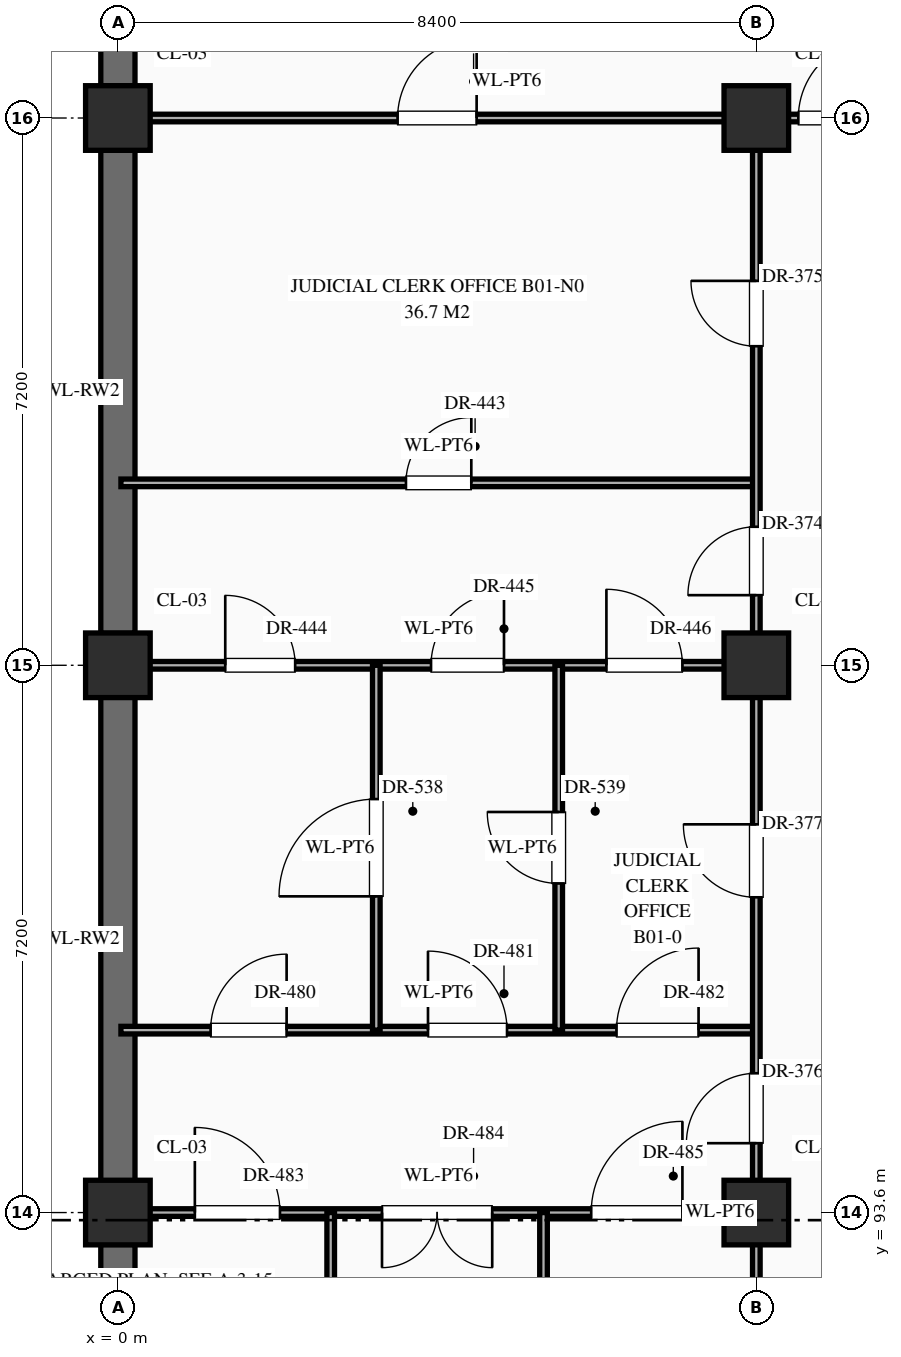
"""IFC4 building model, lengths in metres.
Left out: names, types, materials, properties, quantities, classifications, styles, units other than length and angle.
Written with IfcOpenShell. Run it as: python <this file> out.ifc"""

import sys

from ifc_helpers import new_model, si_unit, direction, frame, frame_2d, origin, origin_2d, place, context, subcontext, project, spatial, rectangle, extrude, element, fill, save


model = new_model("IFC4")
c1 = context("Model", 3, precision=1e-05, world=origin(), true_north=direction((0.0, 1.0)))
c2 = subcontext(c1, "Body", "Model", "MODEL_VIEW")
j1 = project(units=[si_unit("LENGTHUNIT", "METRE"), si_unit("PLANEANGLEUNIT", "RADIAN")], contexts=[c1])
p1 = place(None, origin())
s1 = spatial("IfcSite", under=j1, at=p1, CompositionType="ELEMENT")
p2 = place(p1, origin())
s2 = spatial("IfcBuilding", under=s1, at=p2, CompositionType="ELEMENT")
p3 = place(p2, frame((0.0, 0.0, -5.4)))
s3 = spatial("IfcBuildingStorey", under=s2, at=p3, CompositionType="ELEMENT", Elevation=-5.4)
for number, where, z_axis, x_axis in (
    (1, (0.0, 93.6, 0.0), (0.0, 0.0, 1.0), (1.0, 0.0, 0.0)),
    (2, (0.0, 100.8, 0.0), (0.0, 0.0, 1.0), (1.0, 0.0, 0.0)),
    (3, (0.0, 108.0, 0.0), (0.0, 0.0, 1.0), (1.0, 0.0, 0.0)),
    (4, (8.4, 93.6, 0.0), (0.0, 0.0, 1.0), (1.0, 0.0, 0.0)),
    (5, (8.4, 100.8, 0.0), (0.0, 0.0, 1.0), (1.0, 0.0, 0.0)),
    (6, (8.4, 108.0, 0.0), (0.0, 0.0, 1.0), (1.0, 0.0, 0.0)),
):
    element("IfcColumn", number, at=place(p3, frame(where, z_axis=z_axis, x_axis=x_axis)), inside=s3, PredefinedType="COLUMN", context=c2, shape_type="SweptSolid", body=[
        extrude(rectangle(XDim=0.85, YDim=0.85, at=origin_2d()), origin(), (0.0, 0.0, 1.0), 5.4),
    ])
for number, where, z_axis, x_axis in (
    (7, (0.0, 86.82, 0.0), (0.0, 0.0, 1.0), (0.0, 1.0, 0.0)),
    (8, (0.0, 94.02, 0.0), (0.0, 0.0, 1.0), (0.0, 1.0, 0.0)),
):
    element("IfcWall", number, at=place(p3, frame(where, z_axis=z_axis, x_axis=x_axis)), inside=s3, PredefinedType="USERDEFINED", context=c2, shape_type="SweptSolid", body=[
        extrude(rectangle(XDim=6.36, YDim=0.45, at=frame_2d((3.18, 0.0))), origin(), (0.0, 0.0, 1.0), 5.1),
    ])
p4 = place(p3, frame((0.0, 101.22, 0.0), z_axis=(0.0, 0.0, 1.0), x_axis=(0.0, 1.0, 0.0)))
e9 = element("IfcWall", 9, at=p4, inside=s3, PredefinedType="USERDEFINED", context=c2, shape_type="SweptSolid", body=[
    extrude(rectangle(XDim=6.36, YDim=0.45, at=frame_2d((3.18, 0.0))), origin(), (0.0, 0.0, 1.0), 5.1),
])
p5 = place(p3, frame((0.0, 108.42, 0.0), z_axis=(0.0, 0.0, 1.0), x_axis=(0.0, 1.0, 0.0)))
e10 = element("IfcWall", 10, at=p5, inside=s3, PredefinedType="USERDEFINED", context=c2, shape_type="SweptSolid", body=[
    extrude(rectangle(XDim=6.36, YDim=0.45, at=frame_2d((3.18, 0.0))), origin(), (0.0, 0.0, 1.0), 4.98),
])
p6 = place(p3, frame((0.04, 93.6, 0.0), z_axis=(0.0, 0.0, 1.0), x_axis=(1.0, 0.0, 0.0)))
e11 = element("IfcWall", 11, at=p6, inside=s3, PredefinedType="STANDARD", context=c2, shape_type="SweptSolid", body=[
    extrude(rectangle(XDim=8.36, YDim=0.1, at=frame_2d((4.18, 0.0))), origin(), (0.0, 0.0, 1.0), 4.25),
])
p7 = place(p6, frame((0.972, 0.0, 0.0)))
e12 = element("IfcOpeningElement", 12, at=p7, cuts=e11, PredefinedType="OPENING", context=c2, shape_type="SweptSolid", body=[
    extrude(rectangle(XDim=1.12, YDim=2.25, at=frame_2d((0.56, 1.125))), frame((0.0, 0.062, 0.0), z_axis=(0.0, -1.0, 0.0), x_axis=(1.0, 0.0, 0.0)), (0.0, 0.0, 1.0), 0.124),
])
p8 = place(p6, frame((3.435, 0.0, 0.0)))
e13 = element("IfcOpeningElement", 13, at=p8, cuts=e11, PredefinedType="OPENING", context=c2, shape_type="SweptSolid", body=[
    extrude(rectangle(XDim=1.45, YDim=2.3, at=frame_2d((0.725, 1.15))), frame((0.0, 0.062, 0.0), z_axis=(0.0, -1.0, 0.0), x_axis=(1.0, 0.0, 0.0)), (0.0, 0.0, 1.0), 0.124),
])
p9 = place(p6, frame((6.188, 0.0, 0.0)))
e14 = element("IfcOpeningElement", 14, at=p9, cuts=e11, PredefinedType="OPENING", context=c2, shape_type="SweptSolid", body=[
    extrude(rectangle(XDim=1.2, YDim=2.35, at=frame_2d((0.6, 1.175))), frame((0.0, 0.062, 0.0), z_axis=(0.0, -1.0, 0.0), x_axis=(1.0, 0.0, 0.0)), (0.0, 0.0, 1.0), 0.124),
])
p10 = place(p3, frame((0.04, 96.0, 0.0), z_axis=(0.0, 0.0, 1.0), x_axis=(1.0, 0.0, 0.0)))
e15 = element("IfcWall", 15, at=p10, inside=s3, PredefinedType="STANDARD", context=c2, shape_type="SweptSolid", body=[
    extrude(rectangle(XDim=8.36, YDim=0.1, at=frame_2d((4.18, 0.0))), origin(), (0.0, 0.0, 1.0), 5.1),
])
p11 = place(p10, frame((1.18, 0.0, 0.0)))
e16 = element("IfcOpeningElement", 16, at=p11, cuts=e15, PredefinedType="OPENING", context=c2, shape_type="SweptSolid", body=[
    extrude(rectangle(XDim=1.0, YDim=2.25, at=frame_2d((0.5, 1.125))), frame((0.0, 0.062, 0.0), z_axis=(0.0, -1.0, 0.0), x_axis=(1.0, 0.0, 0.0)), (0.0, 0.0, 1.0), 0.124),
])
p12 = place(p10, frame((4.04, 0.0, 0.0)))
e17 = element("IfcOpeningElement", 17, at=p12, cuts=e15, PredefinedType="OPENING", context=c2, shape_type="SweptSolid", body=[
    extrude(rectangle(XDim=1.04, YDim=2.2, at=frame_2d((0.52, 1.1))), frame((0.0, 0.062, 0.0), z_axis=(0.0, -1.0, 0.0), x_axis=(1.0, 0.0, 0.0)), (0.0, 0.0, 1.0), 0.124),
])
p13 = place(p10, frame((6.52, 0.0, 0.0)))
e18 = element("IfcOpeningElement", 18, at=p13, cuts=e15, PredefinedType="OPENING", context=c2, shape_type="SweptSolid", body=[
    extrude(rectangle(XDim=1.08, YDim=2.25, at=frame_2d((0.54, 1.125))), frame((0.0, 0.062, 0.0), z_axis=(0.0, -1.0, 0.0), x_axis=(1.0, 0.0, 0.0)), (0.0, 0.0, 1.0), 0.124),
])
p14 = place(p3, frame((0.04, 100.8, 0.0), z_axis=(0.0, 0.0, 1.0), x_axis=(1.0, 0.0, 0.0)))
e19 = element("IfcWall", 19, at=p14, inside=s3, PredefinedType="STANDARD", context=c2, shape_type="SweptSolid", body=[
    extrude(rectangle(XDim=8.36, YDim=0.1, at=frame_2d((4.18, 0.0))), origin(), (0.0, 0.0, 1.0), 4.25),
])
p15 = place(p14, frame((1.373, 0.0, 0.0)))
e20 = element("IfcOpeningElement", 20, at=p15, cuts=e19, PredefinedType="OPENING", context=c2, shape_type="SweptSolid", body=[
    extrude(rectangle(XDim=0.92, YDim=2.15, at=frame_2d((0.46, 1.075))), frame((0.0, 0.062, 0.0), z_axis=(0.0, -1.0, 0.0), x_axis=(1.0, 0.0, 0.0)), (0.0, 0.0, 1.0), 0.124),
])
p16 = place(p14, frame((4.08, 0.0, 0.0)))
e21 = element("IfcOpeningElement", 21, at=p16, cuts=e19, PredefinedType="OPENING", context=c2, shape_type="SweptSolid", body=[
    extrude(rectangle(XDim=0.96, YDim=2.2, at=frame_2d((0.48, 1.1))), frame((0.0, 0.062, 0.0), z_axis=(0.0, -1.0, 0.0), x_axis=(1.0, 0.0, 0.0)), (0.0, 0.0, 1.0), 0.124),
])
p17 = place(p14, frame((6.387, 0.0, 0.0)))
e22 = element("IfcOpeningElement", 22, at=p17, cuts=e19, PredefinedType="OPENING", context=c2, shape_type="SweptSolid", body=[
    extrude(rectangle(XDim=1.0, YDim=2.25, at=frame_2d((0.5, 1.125))), frame((0.0, 0.062, 0.0), z_axis=(0.0, -1.0, 0.0), x_axis=(1.0, 0.0, 0.0)), (0.0, 0.0, 1.0), 0.124),
])
p18 = place(p3, frame((0.04, 103.2, 0.0), z_axis=(0.0, 0.0, 1.0), x_axis=(1.0, 0.0, 0.0)))
e23 = element("IfcWall", 23, at=p18, inside=s3, PredefinedType="STANDARD", context=c2, shape_type="SweptSolid", body=[
    extrude(rectangle(XDim=8.36, YDim=0.1, at=frame_2d((4.18, 0.0))), origin(), (0.0, 0.0, 1.0), 5.1),
])
p19 = place(p18, frame((3.75, 0.0, 0.0)))
e24 = element("IfcOpeningElement", 24, at=p19, cuts=e23, PredefinedType="OPENING", context=c2, shape_type="SweptSolid", body=[
    extrude(rectangle(XDim=0.86, YDim=2.1, at=frame_2d((0.43, 1.05))), frame((0.0, 0.062, 0.0), z_axis=(0.0, -1.0, 0.0), x_axis=(1.0, 0.0, 0.0)), (0.0, 0.0, 1.0), 0.124),
])
p20 = place(p3, frame((0.04, 108.0, 0.0), z_axis=(0.0, 0.0, 1.0), x_axis=(1.0, 0.0, 0.0)))
e25 = element("IfcWall", 25, at=p20, inside=s3, PredefinedType="STANDARD", context=c2, shape_type="SweptSolid", body=[
    extrude(rectangle(XDim=10.16, YDim=0.1, at=frame_2d((5.08, 0.0))), origin(), (0.0, 0.0, 1.0), 4.13),
])
p21 = place(p20, frame((8.913, 0.0, 0.0)))
e26 = element("IfcOpeningElement", 26, at=p21, cuts=e25, PredefinedType="OPENING", context=c2, shape_type="SweptSolid", body=[
    extrude(rectangle(XDim=1.04, YDim=2.2, at=frame_2d((0.52, 1.1))), frame((0.0, 0.062, 0.0), z_axis=(0.0, -1.0, 0.0), x_axis=(1.0, 0.0, 0.0)), (0.0, 0.0, 1.0), 0.124),
])
p22 = place(p20, frame((3.64, 0.0, 0.0)))
e27 = element("IfcOpeningElement", 27, at=p22, cuts=e25, PredefinedType="OPENING", context=c2, shape_type="SweptSolid", body=[
    extrude(rectangle(XDim=1.04, YDim=2.2, at=frame_2d((0.52, 1.1))), frame((0.0, 0.062, 0.0), z_axis=(0.0, -1.0, 0.0), x_axis=(1.0, 0.0, 0.0)), (0.0, 0.0, 1.0), 0.124),
])
p23 = place(p3, frame((2.8, 86.4, 0.0), z_axis=(0.0, 0.0, 1.0), x_axis=(0.0, 1.0, 0.0)))
e28 = element("IfcWall", 28, at=p23, inside=s3, PredefinedType="STANDARD", context=c2, shape_type="SweptSolid", body=[
    extrude(rectangle(XDim=7.2, YDim=0.1, at=frame_2d((3.6, 0.0))), origin(), (0.0, 0.0, 1.0), 5.1),
])
p24 = place(p23, frame((3.02, 0.0, 0.0)))
e29 = element("IfcOpeningElement", 29, at=p24, cuts=e28, PredefinedType="OPENING", context=c2, shape_type="SweptSolid", body=[
    extrude(rectangle(XDim=1.16, YDim=2.3, at=frame_2d((0.58, 1.15))), frame((0.0, 0.062, 0.0), z_axis=(0.0, -1.0, 0.0), x_axis=(1.0, 0.0, 0.0)), (0.0, 0.0, 1.0), 0.124),
])
p25 = place(p3, frame((3.4, 96.0, 0.0), z_axis=(0.0, 0.0, 1.0), x_axis=(0.0, 1.0, 0.0)))
e30 = element("IfcWall", 30, at=p25, inside=s3, PredefinedType="STANDARD", context=c2, shape_type="SweptSolid", body=[
    extrude(rectangle(XDim=4.8, YDim=0.1, at=frame_2d((2.4, 0.0))), origin(), (0.0, 0.0, 1.0), 5.1),
])
p26 = place(p25, frame((1.76, 0.0, 0.0)))
e31 = element("IfcOpeningElement", 31, at=p26, cuts=e30, PredefinedType="OPENING", context=c2, shape_type="SweptSolid", body=[
    extrude(rectangle(XDim=1.28, YDim=2.35, at=frame_2d((0.64, 1.175))), frame((0.0, 0.062, 0.0), z_axis=(0.0, -1.0, 0.0), x_axis=(1.0, 0.0, 0.0)), (0.0, 0.0, 1.0), 0.124),
])
p27 = place(p3, frame((5.6, 86.4, 0.0), z_axis=(0.0, 0.0, 1.0), x_axis=(0.0, 1.0, 0.0)))
e32 = element("IfcWall", 32, at=p27, inside=s3, PredefinedType="STANDARD", context=c2, shape_type="SweptSolid", body=[
    extrude(rectangle(XDim=7.2, YDim=0.1, at=frame_2d((3.6, 0.0))), origin(), (0.0, 0.0, 1.0), 5.1),
])
p28 = place(p27, frame((2.98, 0.0, 0.0)))
e33 = element("IfcOpeningElement", 33, at=p28, cuts=e32, PredefinedType="OPENING", context=c2, shape_type="SweptSolid", body=[
    extrude(rectangle(XDim=1.24, YDim=2.3, at=frame_2d((0.62, 1.15))), frame((0.0, 0.062, 0.0), z_axis=(0.0, -1.0, 0.0), x_axis=(1.0, 0.0, 0.0)), (0.0, 0.0, 1.0), 0.124),
])
p29 = place(p3, frame((5.8, 96.0, 0.0), z_axis=(0.0, 0.0, 1.0), x_axis=(0.0, 1.0, 0.0)))
e34 = element("IfcWall", 34, at=p29, inside=s3, PredefinedType="STANDARD", context=c2, shape_type="SweptSolid", body=[
    extrude(rectangle(XDim=4.8, YDim=0.1, at=frame_2d((2.4, 0.0))), origin(), (0.0, 0.0, 1.0), 5.1),
])
p30 = place(p29, frame((1.93, 0.0, 0.0)))
e35 = element("IfcOpeningElement", 35, at=p30, cuts=e34, PredefinedType="OPENING", context=c2, shape_type="SweptSolid", body=[
    extrude(rectangle(XDim=0.94, YDim=2.3, at=frame_2d((0.47, 1.15))), frame((0.0, 0.062, 0.0), z_axis=(0.0, -1.0, 0.0), x_axis=(1.0, 0.0, 0.0)), (0.0, 0.0, 1.0), 0.124),
])
p31 = place(p3, frame((8.4, 79.2, 0.0), z_axis=(0.0, 0.0, 1.0), x_axis=(0.0, 1.0, 0.0)))
e36 = element("IfcWall", 36, at=p31, inside=s3, PredefinedType="STANDARD", context=c2, shape_type="SweptSolid", body=[
    extrude(rectangle(XDim=28.8, YDim=0.1, at=frame_2d((14.4, 0.0))), origin(), (0.0, 0.0, 1.0), 4.35),
])
p32 = place(p31, frame((22.522, 0.0, 0.0)))
e37 = element("IfcOpeningElement", 37, at=p32, cuts=e36, PredefinedType="OPENING", context=c2, shape_type="SweptSolid", body=[
    extrude(rectangle(XDim=0.9, YDim=2.15, at=frame_2d((0.45, 1.075))), frame((0.0, 0.062, 0.0), z_axis=(0.0, -1.0, 0.0), x_axis=(1.0, 0.0, 0.0)), (0.0, 0.0, 1.0), 0.124),
])
p33 = place(p31, frame((25.798, 0.0, 0.0)))
e38 = element("IfcOpeningElement", 38, at=p33, cuts=e36, PredefinedType="OPENING", context=c2, shape_type="SweptSolid", body=[
    extrude(rectangle(XDim=0.86, YDim=2.1, at=frame_2d((0.43, 1.05))), frame((0.0, 0.062, 0.0), z_axis=(0.0, -1.0, 0.0), x_axis=(1.0, 0.0, 0.0)), (0.0, 0.0, 1.0), 0.124),
])
p34 = place(p31, frame((15.312, 0.0, 0.0)))
e39 = element("IfcOpeningElement", 39, at=p34, cuts=e36, PredefinedType="OPENING", context=c2, shape_type="SweptSolid", body=[
    extrude(rectangle(XDim=0.92, YDim=2.15, at=frame_2d((0.46, 1.075))), frame((0.0, 0.062, 0.0), z_axis=(0.0, -1.0, 0.0), x_axis=(1.0, 0.0, 0.0)), (0.0, 0.0, 1.0), 0.124),
])
p35 = place(p31, frame((18.548, 0.0, 0.0)))
e40 = element("IfcOpeningElement", 40, at=p35, cuts=e36, PredefinedType="OPENING", context=c2, shape_type="SweptSolid", body=[
    extrude(rectangle(XDim=0.96, YDim=2.2, at=frame_2d((0.48, 1.1))), frame((0.0, 0.062, 0.0), z_axis=(0.0, -1.0, 0.0), x_axis=(1.0, 0.0, 0.0)), (0.0, 0.0, 1.0), 0.124),
])
p36 = place(p31, frame((10.3, 0.0, 0.0)))
e41 = element("IfcOpeningElement", 41, at=p36, cuts=e36, PredefinedType="OPENING", context=c2, shape_type="SweptSolid", body=[
    extrude(rectangle(XDim=1.0, YDim=2.25, at=frame_2d((0.5, 1.125))), frame((0.0, 0.062, 0.0), z_axis=(0.0, -1.0, 0.0), x_axis=(1.0, 0.0, 0.0)), (0.0, 0.0, 1.0), 0.124),
])
p37 = place(p31, frame((5.288, 0.0, 0.0)))
e42 = element("IfcOpeningElement", 42, at=p37, cuts=e36, PredefinedType="OPENING", context=c2, shape_type="SweptSolid", body=[
    extrude(rectangle(XDim=1.08, YDim=2.25, at=frame_2d((0.54, 1.125))), frame((0.0, 0.062, 0.0), z_axis=(0.0, -1.0, 0.0), x_axis=(1.0, 0.0, 0.0)), (0.0, 0.0, 1.0), 0.124),
])
p38 = place(p31, frame((2.012, 0.0, 0.0)))
e43 = element("IfcOpeningElement", 43, at=p38, cuts=e36, PredefinedType="OPENING", context=c2, shape_type="SweptSolid", body=[
    extrude(rectangle(XDim=1.12, YDim=2.25, at=frame_2d((0.56, 1.125))), frame((0.0, 0.062, 0.0), z_axis=(0.0, -1.0, 0.0), x_axis=(1.0, 0.0, 0.0)), (0.0, 0.0, 1.0), 0.124),
])
p39 = place(p32, origin())
e44 = element("IfcDoor", 44, at=p39, inside=s3, OperationType="SINGLE_SWING_LEFT", PredefinedType="DOOR", context=c2, shape_type="SweptSolid", body=[
    extrude(rectangle(XDim=0.9, YDim=2.15, at=frame_2d((0.45, 1.075))), frame((0.0, 0.025, 0.0), z_axis=(0.0, -1.0, 0.0), x_axis=(1.0, 0.0, 0.0)), (0.0, 0.0, 1.0), 0.05),
])
fill(e37, e44)
p40 = place(p33, origin())
e45 = element("IfcDoor", 45, at=p40, inside=s3, OperationType="SINGLE_SWING_RIGHT", PredefinedType="DOOR", context=c2, shape_type="SweptSolid", body=[
    extrude(rectangle(XDim=0.86, YDim=2.1, at=frame_2d((0.43, 1.05))), frame((0.0, 0.025, 0.0), z_axis=(0.0, -1.0, 0.0), x_axis=(1.0, 0.0, 0.0)), (0.0, 0.0, 1.0), 0.05),
])
fill(e38, e45)
p41 = place(p34, origin())
e46 = element("IfcDoor", 46, at=p41, inside=s3, OperationType="SINGLE_SWING_LEFT", PredefinedType="DOOR", context=c2, shape_type="SweptSolid", body=[
    extrude(rectangle(XDim=0.92, YDim=2.15, at=frame_2d((0.46, 1.075))), frame((0.0, 0.025, 0.0), z_axis=(0.0, -1.0, 0.0), x_axis=(1.0, 0.0, 0.0)), (0.0, 0.0, 1.0), 0.05),
])
fill(e39, e46)
p42 = place(p35, origin())
e47 = element("IfcDoor", 47, at=p42, inside=s3, OperationType="SINGLE_SWING_RIGHT", PredefinedType="DOOR", context=c2, shape_type="SweptSolid", body=[
    extrude(rectangle(XDim=0.96, YDim=2.2, at=frame_2d((0.48, 1.1))), frame((0.0, 0.025, 0.0), z_axis=(0.0, -1.0, 0.0), x_axis=(1.0, 0.0, 0.0)), (0.0, 0.0, 1.0), 0.05),
])
fill(e40, e47)
p43 = place(p21, origin())
e48 = element("IfcDoor", 48, at=p43, inside=s3, OperationType="SINGLE_SWING_RIGHT", PredefinedType="DOOR", context=c2, shape_type="SweptSolid", body=[
    extrude(rectangle(XDim=1.04, YDim=2.2, at=frame_2d((0.52, 1.1))), frame((0.0, 0.025, 0.0), z_axis=(0.0, -1.0, 0.0), x_axis=(1.0, 0.0, 0.0)), (0.0, 0.0, 1.0), 0.05),
])
fill(e26, e48)
p44 = place(p19, origin())
e49 = element("IfcDoor", 49, at=p44, inside=s3, OperationType="SINGLE_SWING_RIGHT", PredefinedType="DOOR", context=c2, shape_type="SweptSolid", body=[
    extrude(rectangle(XDim=0.86, YDim=2.1, at=frame_2d((0.43, 1.05))), frame((0.0, 0.025, 0.0), z_axis=(0.0, -1.0, 0.0), x_axis=(1.0, 0.0, 0.0)), (0.0, 0.0, 1.0), 0.05),
])
fill(e24, e49)
p45 = place(p15, origin())
e50 = element("IfcDoor", 50, at=p45, inside=s3, OperationType="SINGLE_SWING_LEFT", PredefinedType="DOOR", context=c2, shape_type="SweptSolid", body=[
    extrude(rectangle(XDim=0.92, YDim=2.15, at=frame_2d((0.46, 1.075))), frame((0.0, 0.025, 0.0), z_axis=(0.0, -1.0, 0.0), x_axis=(1.0, 0.0, 0.0)), (0.0, 0.0, 1.0), 0.05),
])
fill(e20, e50)
p46 = place(p16, origin())
e51 = element("IfcDoor", 51, at=p46, inside=s3, OperationType="SINGLE_SWING_RIGHT", PredefinedType="DOOR", context=c2, shape_type="SweptSolid", body=[
    extrude(rectangle(XDim=0.96, YDim=2.2, at=frame_2d((0.48, 1.1))), frame((0.0, 0.025, 0.0), z_axis=(0.0, -1.0, 0.0), x_axis=(1.0, 0.0, 0.0)), (0.0, 0.0, 1.0), 0.05),
])
fill(e21, e51)
p47 = place(p17, origin())
e52 = element("IfcDoor", 52, at=p47, inside=s3, OperationType="SINGLE_SWING_LEFT", PredefinedType="DOOR", context=c2, shape_type="SweptSolid", body=[
    extrude(rectangle(XDim=1.0, YDim=2.25, at=frame_2d((0.5, 1.125))), frame((0.0, 0.025, 0.0), z_axis=(0.0, -1.0, 0.0), x_axis=(1.0, 0.0, 0.0)), (0.0, 0.0, 1.0), 0.05),
])
fill(e22, e52)
p48 = place(p22, origin())
e53 = element("IfcDoor", 53, at=p48, inside=s3, OperationType="SINGLE_SWING_RIGHT", PredefinedType="DOOR", context=c2, shape_type="SweptSolid", body=[
    extrude(rectangle(XDim=1.04, YDim=2.2, at=frame_2d((0.52, 1.1))), frame((0.0, 0.025, 0.0), z_axis=(0.0, -1.0, 0.0), x_axis=(1.0, 0.0, 0.0)), (0.0, 0.0, 1.0), 0.05),
])
fill(e27, e53)
p49 = place(p11, origin())
e54 = element("IfcDoor", 54, at=p49, inside=s3, OperationType="SINGLE_SWING_RIGHT", PredefinedType="DOOR", context=c2, shape_type="SweptSolid", body=[
    extrude(rectangle(XDim=1.0, YDim=2.25, at=frame_2d((0.5, 1.125))), frame((0.0, 0.025, 0.0), z_axis=(0.0, -1.0, 0.0), x_axis=(1.0, 0.0, 0.0)), (0.0, 0.0, 1.0), 0.05),
])
fill(e16, e54)
p50 = place(p12, origin())
e55 = element("IfcDoor", 55, at=p50, inside=s3, OperationType="SINGLE_SWING_LEFT", PredefinedType="DOOR", context=c2, shape_type="SweptSolid", body=[
    extrude(rectangle(XDim=1.04, YDim=2.2, at=frame_2d((0.52, 1.1))), frame((0.0, 0.025, 0.0), z_axis=(0.0, -1.0, 0.0), x_axis=(1.0, 0.0, 0.0)), (0.0, 0.0, 1.0), 0.05),
])
fill(e17, e55)
p51 = place(p13, origin())
e56 = element("IfcDoor", 56, at=p51, inside=s3, OperationType="SINGLE_SWING_RIGHT", PredefinedType="DOOR", context=c2, shape_type="SweptSolid", body=[
    extrude(rectangle(XDim=1.08, YDim=2.25, at=frame_2d((0.54, 1.125))), frame((0.0, 0.025, 0.0), z_axis=(0.0, -1.0, 0.0), x_axis=(1.0, 0.0, 0.0)), (0.0, 0.0, 1.0), 0.05),
])
fill(e18, e56)
p52 = place(p7, origin())
e57 = element("IfcDoor", 57, at=p52, inside=s3, OperationType="SINGLE_SWING_LEFT", PredefinedType="DOOR", context=c2, shape_type="SweptSolid", body=[
    extrude(rectangle(XDim=1.12, YDim=2.25, at=frame_2d((0.56, 1.125))), frame((0.0, 0.025, 0.0), z_axis=(0.0, -1.0, 0.0), x_axis=(1.0, 0.0, 0.0)), (0.0, 0.0, 1.0), 0.05),
])
fill(e12, e57)
p53 = place(p8, frame((1.45, 0.0, 0.0), z_axis=(0.0, 0.0, 1.0), x_axis=(-1.0, 0.0, 0.0)))
e58 = element("IfcDoor", 58, at=p53, inside=s3, OperationType="DOUBLE_DOOR_SINGLE_SWING", PredefinedType="DOOR", context=c2, shape_type="SweptSolid", body=[
    extrude(rectangle(XDim=1.45, YDim=2.3, at=frame_2d((0.725, 1.15))), frame((0.0, 0.025, 0.0), z_axis=(0.0, -1.0, 0.0), x_axis=(1.0, 0.0, 0.0)), (0.0, 0.0, 1.0), 0.05),
])
fill(e13, e58)
p54 = place(p9, origin())
e59 = element("IfcDoor", 59, at=p54, inside=s3, OperationType="SINGLE_SWING_RIGHT", PredefinedType="DOOR", context=c2, shape_type="SweptSolid", body=[
    extrude(rectangle(XDim=1.2, YDim=2.35, at=frame_2d((0.6, 1.175))), frame((0.0, 0.025, 0.0), z_axis=(0.0, -1.0, 0.0), x_axis=(1.0, 0.0, 0.0)), (0.0, 0.0, 1.0), 0.05),
])
fill(e14, e59)
p55 = place(p26, origin())
e60 = element("IfcDoor", 60, at=p55, inside=s3, OperationType="SINGLE_SWING_LEFT", PredefinedType="DOOR", context=c2, shape_type="SweptSolid", body=[
    extrude(rectangle(XDim=1.28, YDim=2.35, at=frame_2d((0.64, 1.175))), frame((0.0, 0.025, 0.0), z_axis=(0.0, -1.0, 0.0), x_axis=(1.0, 0.0, 0.0)), (0.0, 0.0, 1.0), 0.05),
])
fill(e31, e60)
p56 = place(p30, origin())
e61 = element("IfcDoor", 61, at=p56, inside=s3, OperationType="SINGLE_SWING_RIGHT", PredefinedType="DOOR", context=c2, shape_type="SweptSolid", body=[
    extrude(rectangle(XDim=0.94, YDim=2.3, at=frame_2d((0.47, 1.15))), frame((0.0, 0.025, 0.0), z_axis=(0.0, -1.0, 0.0), x_axis=(1.0, 0.0, 0.0)), (0.0, 0.0, 1.0), 0.05),
])
fill(e35, e61)
save(model, sys.argv[1])
